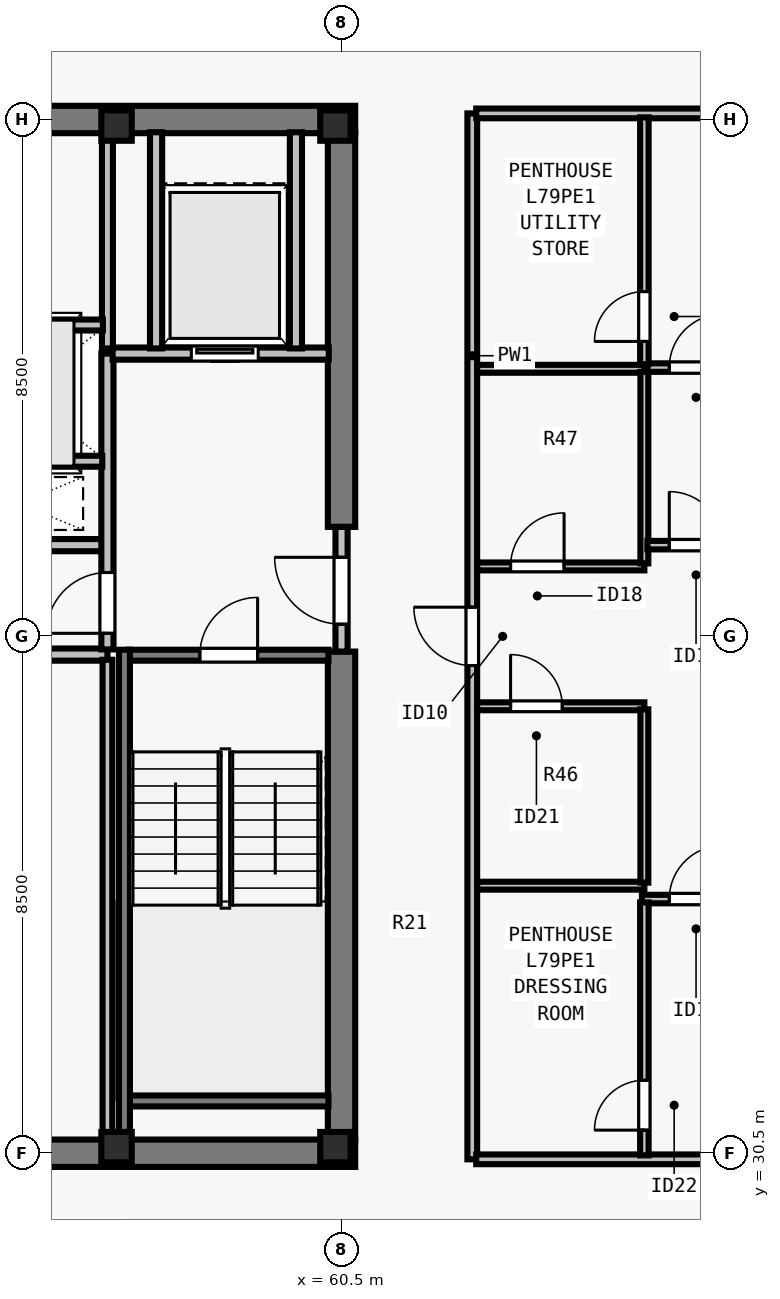
"""IFC4 building model, lengths in metres.
Left out: names, types, materials, properties, quantities, classifications, styles, units other than length and angle.
Written with IfcOpenShell. Run it as: python <this file> out.ifc"""

import sys

from ifc_helpers import new_model, si_unit, direction, frame, frame_2d, origin, origin_2d, place, context, subcontext, project, spatial, rectangle, i_section, extrude, element, fill, save


model = new_model("IFC4")
c1 = context("Model", 3, precision=1e-05, world=origin(), true_north=direction((0.0, 1.0)))
c2 = subcontext(c1, "Body", "Model", "MODEL_VIEW")
j1 = project(units=[si_unit("LENGTHUNIT", "METRE"), si_unit("PLANEANGLEUNIT", "RADIAN")], contexts=[c1])
p1 = place(None, origin())
s1 = spatial("IfcSite", under=j1, at=p1, CompositionType="ELEMENT")
p2 = place(p1, origin())
s2 = spatial("IfcBuilding", under=s1, at=p2, CompositionType="ELEMENT")
p3 = place(p2, frame((0.0, 0.0, 287.5)))
s3 = spatial("IfcBuildingStorey", under=s2, at=p3, CompositionType="ELEMENT", Elevation=287.5)
for number, where, z_axis, x_axis in (
    (1, (56.8, 30.6, 0.0), (0.0, 0.0, 1.0), (1.0, 0.0, 0.0)),
    (2, (60.4, 30.6, 0.0), (0.0, 0.0, 1.0), (1.0, 0.0, 0.0)),
    (3, (56.8, 47.4, 0.0), (0.0, 0.0, 1.0), (1.0, 0.0, 0.0)),
    (4, (60.4, 47.4, 0.0), (0.0, 0.0, 1.0), (1.0, 0.0, 0.0)),
):
    element("IfcColumn", number, at=place(p3, frame(where, z_axis=z_axis, x_axis=x_axis)), inside=s3, PredefinedType="COLUMN", context=c2, shape_type="SweptSolid", body=[
        extrude(i_section(OverallWidth=0.5, OverallDepth=0.5, WebThickness=0.028, FlangeThickness=0.045, at=origin_2d()), origin(), (0.0, 0.0, 1.0), 3.5),
    ])
for number, where, z_axis, x_axis in (
    (5, (43.275, 30.5, 0.0), (0.0, 0.0, 1.0), (1.0, 0.0, 0.0)),
    (6, (43.275, 47.5, 0.0), (0.0, 0.0, 1.0), (1.0, 0.0, 0.0)),
):
    element("IfcWall", number, at=place(p3, frame(where, z_axis=z_axis, x_axis=x_axis)), inside=s3, PredefinedType="SHEAR", context=c2, shape_type="SweptSolid", body=[
        extrude(rectangle(XDim=17.45, YDim=0.45, at=frame_2d((8.725, 0.0))), origin(), (0.0, 0.0, 1.0), 3.29),
    ])
p4 = place(p3, frame((60.5, 30.715, 0.0), z_axis=(0.0, 0.0, 1.0), x_axis=(0.0, 1.0, 0.0)))
e7 = element("IfcWall", 7, at=p4, inside=s3, PredefinedType="SHEAR", context=c2, shape_type="SweptSolid", body=[
    extrude(rectangle(XDim=8.035, YDim=0.45, at=frame_2d((4.018, 0.0))), origin(), (0.0, 0.0, 1.0), 3.29),
])
p5 = place(p3, frame((60.5, 40.8, 0.0), z_axis=(0.0, 0.0, 1.0), x_axis=(0.0, 1.0, 0.0)))
e8 = element("IfcWall", 8, at=p5, inside=s3, PredefinedType="SHEAR", context=c2, shape_type="SweptSolid", body=[
    extrude(rectangle(XDim=6.485, YDim=0.45, at=frame_2d((3.242, 0.0))), origin(), (0.0, 0.0, 1.0), 3.29),
])
for number, where, z_axis, x_axis in (
    (9, (53.7, 38.7, 0.0), (0.0, 0.0, 1.0), (1.0, 0.0, 0.0)),
    (10, (53.7, 40.5, 0.0), (0.0, 0.0, 1.0), (1.0, 0.0, 0.0)),
):
    element("IfcWall", number, at=place(p3, frame(where, z_axis=z_axis, x_axis=x_axis)), inside=s3, PredefinedType="SOLIDWALL", context=c2, shape_type="SweptSolid", body=[
        extrude(rectangle(XDim=2.95, YDim=0.2, at=frame_2d((1.475, 0.0))), origin(), (0.0, 0.0, 1.0), 3.29),
    ])
p6 = place(p3, frame((60.5, 38.75, 0.0), z_axis=(0.0, 0.0, 1.0), x_axis=(0.0, 1.0, 0.0)))
e11 = element("IfcWall", 11, at=p6, inside=s3, PredefinedType="SOLIDWALL", context=c2, shape_type="SweptSolid", body=[
    extrude(rectangle(XDim=2.05, YDim=0.2, at=frame_2d((1.025, 0.0))), origin(), (0.0, 0.0, 1.0), 3.29),
])
p7 = place(p6, frame((0.45, 0.0, 0.0)))
e12 = element("IfcOpeningElement", 12, at=p7, cuts=e11, PredefinedType="OPENING", context=c2, shape_type="SweptSolid", body=[
    extrude(rectangle(XDim=1.1, YDim=2.15, at=frame_2d((0.55, 1.075))), frame((0.0, 0.11, 0.0), z_axis=(0.0, -1.0, 0.0), x_axis=(1.0, 0.0, 0.0)), (0.0, 0.0, 1.0), 0.22),
])
p8 = place(p3, frame((56.65, 38.785, 0.0), z_axis=(0.0, 0.0, 1.0), x_axis=(0.0, 1.0, 0.0)))
e13 = element("IfcWall", 13, at=p8, inside=s3, PredefinedType="SOLIDWALL", context=c2, shape_type="SweptSolid", body=[
    extrude(rectangle(XDim=4.865, YDim=0.2, at=frame_2d((2.433, 0.0))), origin(), (0.0, 0.0, 1.0), 3.29),
])
p9 = place(p8, frame((0.265, 0.0, 0.0)))
e14 = element("IfcOpeningElement", 14, at=p9, cuts=e13, PredefinedType="OPENING", context=c2, shape_type="SweptSolid", body=[
    extrude(rectangle(XDim=1.0, YDim=2.15, at=frame_2d((0.5, 1.075))), frame((0.0, 0.11, 0.0), z_axis=(0.0, -1.0, 0.0), x_axis=(1.0, 0.0, 0.0)), (0.0, 0.0, 1.0), 0.22),
])
p10 = place(p3, frame((56.735, 43.65, 0.0), z_axis=(0.0, 0.0, 1.0), x_axis=(1.0, 0.0, 0.0)))
e15 = element("IfcWall", 15, at=p10, inside=s3, PredefinedType="SOLIDWALL", context=c2, shape_type="SweptSolid", body=[
    extrude(rectangle(XDim=3.555, YDim=0.2, at=frame_2d((1.777, 0.0))), origin(), (0.0, 0.0, 1.0), 3.29),
])
p11 = place(p10, frame((1.295, 0.0, 0.0)))
e16 = element("IfcOpeningElement", 16, at=p11, cuts=e15, PredefinedType="OPENING", context=c2, shape_type="SweptSolid", body=[
    extrude(rectangle(XDim=1.1, YDim=2.2, at=frame_2d((0.55, 1.1))), frame((0.0, 0.11, 0.0), z_axis=(0.0, -1.0, 0.0), x_axis=(1.0, 0.0, 0.0)), (0.0, 0.0, 1.0), 0.22),
])
for number, where, z_axis, x_axis in (
    (17, (57.45, 43.735, 0.0), (0.0, 0.0, 1.0), (0.0, 1.0, 0.0)),
    (18, (59.75, 43.735, 0.0), (0.0, 0.0, 1.0), (0.0, 1.0, 0.0)),
):
    element("IfcWall", number, at=place(p3, frame(where, z_axis=z_axis, x_axis=x_axis)), inside=s3, PredefinedType="SOLIDWALL", context=c2, shape_type="SweptSolid", body=[
        extrude(rectangle(XDim=3.555, YDim=0.2, at=frame_2d((1.777, 0.0))), origin(), (0.0, 0.0, 1.0), 3.29),
    ])
p12 = place(p3, frame((56.65, 30.71, 0.0), z_axis=(0.0, 0.0, 1.0), x_axis=(0.0, 1.0, 0.0)))
e19 = element("IfcWall", 19, at=p12, inside=s3, PredefinedType="PARTITIONING", context=c2, shape_type="SweptSolid", body=[
    extrude(rectangle(XDim=7.905, YDim=0.16, at=frame_2d((3.953, 0.0))), origin(), (0.0, 0.0, 1.0), 3.29),
])
p13 = place(p3, frame((56.65, 43.735, 0.0), z_axis=(0.0, 0.0, 1.0), x_axis=(0.0, 1.0, 0.0)))
e20 = element("IfcWall", 20, at=p13, inside=s3, PredefinedType="SOLIDWALL", context=c2, shape_type="SweptSolid", body=[
    extrude(rectangle(XDim=3.555, YDim=0.18, at=frame_2d((1.777, 0.0))), origin(), (0.0, 0.0, 1.0), 3.29),
])
p14 = place(p3, frame((53.785, 41.88, 0.0), z_axis=(0.0, 0.0, 1.0), x_axis=(1.0, 0.0, 0.0)))
e21 = element("IfcWall", 21, at=p14, inside=s3, PredefinedType="SOLIDWALL", context=c2, shape_type="SweptSolid", body=[
    extrude(rectangle(XDim=2.78, YDim=0.18, at=frame_2d((1.39, 0.0))), origin(), (0.0, 0.0, 1.0), 3.29),
])
p15 = place(p3, frame((53.785, 44.12, 0.0), z_axis=(0.0, 0.0, 1.0), x_axis=(1.0, 0.0, 0.0)))
e22 = element("IfcWall", 22, at=p15, inside=s3, PredefinedType="SOLIDWALL", context=c2, shape_type="SweptSolid", body=[
    extrude(rectangle(XDim=2.79, YDim=0.18, at=frame_2d((1.395, 0.0))), origin(), (0.0, 0.0, 1.0), 3.29),
])
p16 = place(p3, frame((62.65, 30.4, 0.0), z_axis=(0.0, 0.0, 1.0), x_axis=(0.0, 1.0, 0.0)))
e23 = element("IfcWall", 23, at=p16, inside=s3, PredefinedType="PARTITIONING", context=c2, shape_type="SweptSolid", body=[
    extrude(rectangle(XDim=17.2, YDim=0.16, at=frame_2d((8.6, 0.0))), origin(), (0.0, 0.0, 1.0), 3.29),
])
p17 = place(p16, frame((8.12, 0.0, 0.0)))
e24 = element("IfcOpeningElement", 24, at=p17, cuts=e23, PredefinedType="OPENING", context=c2, shape_type="SweptSolid", body=[
    extrude(rectangle(XDim=0.96, YDim=2.18, at=frame_2d((0.48, 1.09))), frame((0.0, 0.09, 0.0), z_axis=(0.0, -1.0, 0.0), x_axis=(1.0, 0.0, 0.0)), (0.0, 0.0, 1.0), 0.18),
])
for number, where, z_axis, x_axis in (
    (25, (62.715, 30.4, 0.0), (0.0, 0.0, 1.0), (1.0, 0.0, 0.0)),
    (26, (62.715, 47.6, 0.0), (0.0, 0.0, 1.0), (1.0, 0.0, 0.0)),
):
    element("IfcWall", number, at=place(p3, frame(where, z_axis=z_axis, x_axis=x_axis)), inside=s3, PredefinedType="PARTITIONING", context=c2, shape_type="SweptSolid", body=[
        extrude(rectangle(XDim=10.0, YDim=0.16, at=frame_2d((5.0, 0.0))), origin(), (0.0, 0.0, 1.0), 3.29),
    ])
p18 = place(p3, frame((62.73, 34.9, 0.0), z_axis=(0.0, 0.0, 1.0), x_axis=(1.0, 0.0, 0.0)))
e27 = element("IfcWall", 27, at=p18, inside=s3, PredefinedType="PLUMBINGWALL", context=c2, shape_type="SweptSolid", body=[
    extrude(rectangle(XDim=2.75, YDim=0.13, at=frame_2d((1.375, 0.0))), origin(), (0.0, 0.0, 1.0), 3.29),
])
p19 = place(p3, frame((62.73, 37.85, 0.0), z_axis=(0.0, 0.0, 1.0), x_axis=(1.0, 0.0, 0.0)))
e28 = element("IfcWall", 28, at=p19, inside=s3, PredefinedType="PLUMBINGWALL", context=c2, shape_type="SweptSolid", body=[
    extrude(rectangle(XDim=2.75, YDim=0.13, at=frame_2d((1.375, 0.0))), origin(), (0.0, 0.0, 1.0), 3.29),
])
p20 = place(p19, frame((0.55, 0.0, 0.0)))
e29 = element("IfcOpeningElement", 29, at=p20, cuts=e28, PredefinedType="OPENING", context=c2, shape_type="SweptSolid", body=[
    extrude(rectangle(XDim=0.85, YDim=2.08, at=frame_2d((0.425, 1.04))), frame((0.0, 0.075, 0.0), z_axis=(0.0, -1.0, 0.0), x_axis=(1.0, 0.0, 0.0)), (0.0, 0.0, 1.0), 0.15),
])
p21 = place(p3, frame((65.48, 34.95, 0.0), z_axis=(0.0, 0.0, 1.0), x_axis=(0.0, 1.0, 0.0)))
e30 = element("IfcWall", 30, at=p21, inside=s3, PredefinedType="PLUMBINGWALL", context=c2, shape_type="SweptSolid", body=[
    extrude(rectangle(XDim=2.85, YDim=0.13, at=frame_2d((1.425, 0.0))), origin(), (0.0, 0.0, 1.0), 3.29),
])
p22 = place(p3, frame((62.73, 43.4, 0.0), z_axis=(0.0, 0.0, 1.0), x_axis=(1.0, 0.0, 0.0)))
e31 = element("IfcWall", 31, at=p22, inside=s3, PredefinedType="PLUMBINGWALL", context=c2, shape_type="SweptSolid", body=[
    extrude(rectangle(XDim=2.75, YDim=0.13, at=frame_2d((1.375, 0.0))), origin(), (0.0, 0.0, 1.0), 3.29),
])
p23 = place(p3, frame((62.73, 40.15, 0.0), z_axis=(0.0, 0.0, 1.0), x_axis=(1.0, 0.0, 0.0)))
e32 = element("IfcWall", 32, at=p23, inside=s3, PredefinedType="PLUMBINGWALL", context=c2, shape_type="SweptSolid", body=[
    extrude(rectangle(XDim=2.75, YDim=0.13, at=frame_2d((1.375, 0.0))), origin(), (0.0, 0.0, 1.0), 3.29),
])
p24 = place(p23, frame((0.55, 0.0, 0.0)))
e33 = element("IfcOpeningElement", 33, at=p24, cuts=e32, PredefinedType="OPENING", context=c2, shape_type="SweptSolid", body=[
    extrude(rectangle(XDim=0.88, YDim=2.1, at=frame_2d((0.44, 1.05))), frame((0.0, 0.075, 0.0), z_axis=(0.0, -1.0, 0.0), x_axis=(1.0, 0.0, 0.0)), (0.0, 0.0, 1.0), 0.15),
])
p25 = place(p3, frame((65.48, 40.2, 0.0), z_axis=(0.0, 0.0, 1.0), x_axis=(0.0, 1.0, 0.0)))
e34 = element("IfcWall", 34, at=p25, inside=s3, PredefinedType="PLUMBINGWALL", context=c2, shape_type="SweptSolid", body=[
    extrude(rectangle(XDim=3.15, YDim=0.13, at=frame_2d((1.575, 0.0))), origin(), (0.0, 0.0, 1.0), 3.29),
])
p26 = place(p3, frame((65.44, 34.68, 0.0), z_axis=(0.0, 0.0, 1.0), x_axis=(1.0, 0.0, 0.0)))
e35 = element("IfcWall", 35, at=p26, inside=s3, PredefinedType="PARTITIONING", context=c2, shape_type="SweptSolid", body=[
    extrude(rectangle(XDim=7.18, YDim=0.14, at=frame_2d((3.59, 0.0))), origin(), (0.0, 0.0, 1.0), 3.29),
])
p27 = place(p26, frame((0.45, 0.0, 0.0)))
e36 = element("IfcOpeningElement", 36, at=p27, cuts=e35, PredefinedType="OPENING", context=c2, shape_type="SweptSolid", body=[
    extrude(rectangle(XDim=0.88, YDim=2.1, at=frame_2d((0.44, 1.05))), frame((0.0, 0.08, 0.0), z_axis=(0.0, -1.0, 0.0), x_axis=(1.0, 0.0, 0.0)), (0.0, 0.0, 1.0), 0.16),
])
p28 = place(p3, frame((65.48, 30.465, 0.0), z_axis=(0.0, 0.0, 1.0), x_axis=(0.0, 1.0, 0.0)))
e37 = element("IfcWall", 37, at=p28, inside=s3, PredefinedType="PARTITIONING", context=c2, shape_type="SweptSolid", body=[
    extrude(rectangle(XDim=4.16, YDim=0.14, at=frame_2d((2.08, 0.0))), origin(), (0.0, 0.0, 1.0), 3.29),
])
p29 = place(p28, frame((0.415, 0.0, 0.0)))
e38 = element("IfcOpeningElement", 38, at=p29, cuts=e37, PredefinedType="OPENING", context=c2, shape_type="SweptSolid", body=[
    extrude(rectangle(XDim=0.82, YDim=2.1, at=frame_2d((0.41, 1.05))), frame((0.0, 0.08, 0.0), z_axis=(0.0, -1.0, 0.0), x_axis=(1.0, 0.0, 0.0)), (0.0, 0.0, 1.0), 0.16),
])
p30 = place(p3, frame((65.53, 43.42, 0.0), z_axis=(0.0, 0.0, 1.0), x_axis=(1.0, 0.0, 0.0)))
e39 = element("IfcWall", 39, at=p30, inside=s3, PredefinedType="PARTITIONING", context=c2, shape_type="SweptSolid", body=[
    extrude(rectangle(XDim=7.09, YDim=0.14, at=frame_2d((3.545, 0.0))), origin(), (0.0, 0.0, 1.0), 3.29),
])
p31 = place(p30, frame((0.36, 0.0, 0.0)))
e40 = element("IfcOpeningElement", 40, at=p31, cuts=e39, PredefinedType="OPENING", context=c2, shape_type="SweptSolid", body=[
    extrude(rectangle(XDim=0.88, YDim=2.1, at=frame_2d((0.44, 1.05))), frame((0.0, 0.08, 0.0), z_axis=(0.0, -1.0, 0.0), x_axis=(1.0, 0.0, 0.0)), (0.0, 0.0, 1.0), 0.16),
])
p32 = place(p3, frame((65.48, 43.475, 0.0), z_axis=(0.0, 0.0, 1.0), x_axis=(0.0, 1.0, 0.0)))
e41 = element("IfcWall", 41, at=p32, inside=s3, PredefinedType="PARTITIONING", context=c2, shape_type="SweptSolid", body=[
    extrude(rectangle(XDim=4.06, YDim=0.14, at=frame_2d((2.03, 0.0))), origin(), (0.0, 0.0, 1.0), 3.29),
])
p33 = place(p32, frame((0.375, 0.0, 0.0)))
e42 = element("IfcOpeningElement", 42, at=p33, cuts=e41, PredefinedType="OPENING", context=c2, shape_type="SweptSolid", body=[
    extrude(rectangle(XDim=0.82, YDim=2.1, at=frame_2d((0.41, 1.05))), frame((0.0, 0.08, 0.0), z_axis=(0.0, -1.0, 0.0), x_axis=(1.0, 0.0, 0.0)), (0.0, 0.0, 1.0), 0.16),
])
p34 = place(p3, frame((65.53, 40.5, 0.0), z_axis=(0.0, 0.0, 1.0), x_axis=(1.0, 0.0, 0.0)))
e43 = element("IfcWall", 43, at=p34, inside=s3, PredefinedType="PARTITIONING", context=c2, shape_type="SweptSolid", body=[
    extrude(rectangle(XDim=7.09, YDim=0.14, at=frame_2d((3.545, 0.0))), origin(), (0.0, 0.0, 1.0), 3.29),
])
p35 = place(p34, frame((0.36, 0.0, 0.0)))
e44 = element("IfcOpeningElement", 44, at=p35, cuts=e43, PredefinedType="OPENING", context=c2, shape_type="SweptSolid", body=[
    extrude(rectangle(XDim=0.88, YDim=2.1, at=frame_2d((0.44, 1.05))), frame((0.0, 0.08, 0.0), z_axis=(0.0, -1.0, 0.0), x_axis=(1.0, 0.0, 0.0)), (0.0, 0.0, 1.0), 0.16),
])
p36 = place(p3, frame((57.005, 38.69, 0.0), z_axis=(0.0, 0.0, 1.0), x_axis=(1.0, 0.0, 0.0)))
e45 = element("IfcWall", 45, at=p36, inside=s3, PredefinedType="SOLIDWALL", context=c2, shape_type="SweptSolid", body=[
    extrude(rectangle(XDim=3.28, YDim=0.18, at=frame_2d((1.64, 0.0))), origin(), (0.0, 0.0, 1.0), 3.29),
])
p37 = place(p36, frame((1.165, 0.0, 0.0)))
e46 = element("IfcOpeningElement", 46, at=p37, cuts=e45, PredefinedType="OPENING", context=c2, shape_type="SweptSolid", body=[
    extrude(rectangle(XDim=0.95, YDim=2.15, at=frame_2d((0.475, 1.075))), frame((0.0, 0.1, 0.0), z_axis=(0.0, -1.0, 0.0), x_axis=(1.0, 0.0, 0.0)), (0.0, 0.0, 1.0), 0.2),
])
p38 = place(p3, frame((57.005, 31.36, 0.0), z_axis=(0.0, 0.0, 1.0), x_axis=(1.0, 0.0, 0.0)))
e47 = element("IfcWall", 47, at=p38, inside=s3, PredefinedType="SOLIDWALL", context=c2, shape_type="SweptSolid", body=[
    extrude(rectangle(XDim=3.28, YDim=0.18, at=frame_2d((1.64, 0.0))), origin(), (0.0, 0.0, 1.0), 3.29),
])
p39 = place(p3, frame((56.93, 38.78, 0.0), z_axis=(0.0, 0.0, 1.0), x_axis=(0.0, -1.0, 0.0)))
e48 = element("IfcWall", 48, at=p39, inside=s3, PredefinedType="SOLIDWALL", context=c2, shape_type="SweptSolid", body=[
    extrude(rectangle(XDim=8.067, YDim=0.18, at=frame_2d((4.034, 0.0))), origin(), (0.0, 0.0, 1.0), 3.29),
])
p40 = place(p7, origin())
e49 = element("IfcDoor", 49, at=p40, inside=s3, OperationType="SINGLE_SWING_RIGHT", PredefinedType="DOOR", context=c2, shape_type="SweptSolid", body=[
    extrude(rectangle(XDim=1.1, YDim=2.15, at=frame_2d((0.55, 1.075))), frame((0.0, 0.025, 0.0), z_axis=(0.0, -1.0, 0.0), x_axis=(1.0, 0.0, 0.0)), (0.0, 0.0, 1.0), 0.05),
])
fill(e12, e49)
p41 = place(p9, origin())
e50 = element("IfcDoor", 50, at=p41, inside=s3, OperationType="SINGLE_SWING_LEFT", PredefinedType="DOOR", context=c2, shape_type="SweptSolid", body=[
    extrude(rectangle(XDim=1.0, YDim=2.15, at=frame_2d((0.5, 1.075))), frame((0.0, 0.025, 0.0), z_axis=(0.0, -1.0, 0.0), x_axis=(1.0, 0.0, 0.0)), (0.0, 0.0, 1.0), 0.05),
])
fill(e14, e50)
p42 = place(p11, origin())
e51 = element("IfcDoor", 51, at=p42, inside=s3, OperationType="SLIDING_TO_LEFT", PredefinedType="DOOR", context=c2, shape_type="SweptSolid", body=[
    extrude(rectangle(XDim=1.1, YDim=2.2, at=frame_2d((0.55, 1.1))), frame((0.0, 0.025, 0.0), z_axis=(0.0, -1.0, 0.0), x_axis=(1.0, 0.0, 0.0)), (0.0, 0.0, 1.0), 0.05),
])
fill(e16, e51)
p43 = place(p20, origin())
e52 = element("IfcDoor", 52, at=p43, inside=s3, OperationType="SINGLE_SWING_LEFT", PredefinedType="DOOR", context=c2, shape_type="SweptSolid", body=[
    extrude(rectangle(XDim=0.85, YDim=2.08, at=frame_2d((0.425, 1.04))), frame((0.0, 0.025, 0.0), z_axis=(0.0, -1.0, 0.0), x_axis=(1.0, 0.0, 0.0)), (0.0, 0.0, 1.0), 0.05),
])
fill(e29, e52)
p44 = place(p24, origin())
e53 = element("IfcDoor", 53, at=p44, inside=s3, OperationType="SINGLE_SWING_RIGHT", PredefinedType="DOOR", context=c2, shape_type="SweptSolid", body=[
    extrude(rectangle(XDim=0.88, YDim=2.1, at=frame_2d((0.44, 1.05))), frame((0.0, 0.025, 0.0), z_axis=(0.0, -1.0, 0.0), x_axis=(1.0, 0.0, 0.0)), (0.0, 0.0, 1.0), 0.05),
])
fill(e33, e53)
p45 = place(p29, origin())
e54 = element("IfcDoor", 54, at=p45, inside=s3, OperationType="SINGLE_SWING_LEFT", PredefinedType="DOOR", context=c2, shape_type="SweptSolid", body=[
    extrude(rectangle(XDim=0.82, YDim=2.1, at=frame_2d((0.41, 1.05))), frame((0.0, 0.025, 0.0), z_axis=(0.0, -1.0, 0.0), x_axis=(1.0, 0.0, 0.0)), (0.0, 0.0, 1.0), 0.05),
])
fill(e38, e54)
p46 = place(p27, origin())
e55 = element("IfcDoor", 55, at=p46, inside=s3, OperationType="SINGLE_SWING_RIGHT", PredefinedType="DOOR", context=c2, shape_type="SweptSolid", body=[
    extrude(rectangle(XDim=0.88, YDim=2.1, at=frame_2d((0.44, 1.05))), frame((0.0, 0.025, 0.0), z_axis=(0.0, -1.0, 0.0), x_axis=(1.0, 0.0, 0.0)), (0.0, 0.0, 1.0), 0.05),
])
fill(e36, e55)
p47 = place(p33, origin())
e56 = element("IfcDoor", 56, at=p47, inside=s3, OperationType="SINGLE_SWING_LEFT", PredefinedType="DOOR", context=c2, shape_type="SweptSolid", body=[
    extrude(rectangle(XDim=0.82, YDim=2.1, at=frame_2d((0.41, 1.05))), frame((0.0, 0.025, 0.0), z_axis=(0.0, -1.0, 0.0), x_axis=(1.0, 0.0, 0.0)), (0.0, 0.0, 1.0), 0.05),
])
fill(e42, e56)
p48 = place(p31, origin())
e57 = element("IfcDoor", 57, at=p48, inside=s3, OperationType="SINGLE_SWING_RIGHT", PredefinedType="DOOR", context=c2, shape_type="SweptSolid", body=[
    extrude(rectangle(XDim=0.88, YDim=2.1, at=frame_2d((0.44, 1.05))), frame((0.0, 0.025, 0.0), z_axis=(0.0, -1.0, 0.0), x_axis=(1.0, 0.0, 0.0)), (0.0, 0.0, 1.0), 0.05),
])
fill(e40, e57)
p49 = place(p35, origin())
e58 = element("IfcDoor", 58, at=p49, inside=s3, OperationType="SINGLE_SWING_LEFT", PredefinedType="DOOR", context=c2, shape_type="SweptSolid", body=[
    extrude(rectangle(XDim=0.88, YDim=2.1, at=frame_2d((0.44, 1.05))), frame((0.0, 0.025, 0.0), z_axis=(0.0, -1.0, 0.0), x_axis=(1.0, 0.0, 0.0)), (0.0, 0.0, 1.0), 0.05),
])
fill(e44, e58)
p50 = place(p17, origin())
e59 = element("IfcDoor", 59, at=p50, inside=s3, OperationType="SINGLE_SWING_RIGHT", PredefinedType="DOOR", context=c2, shape_type="SweptSolid", body=[
    extrude(rectangle(XDim=0.96, YDim=2.18, at=frame_2d((0.48, 1.09))), frame((0.0, 0.025, 0.0), z_axis=(0.0, -1.0, 0.0), x_axis=(1.0, 0.0, 0.0)), (0.0, 0.0, 1.0), 0.05),
])
fill(e24, e59)
p51 = place(p37, origin())
e60 = element("IfcDoor", 60, at=p51, inside=s3, OperationType="SINGLE_SWING_RIGHT", PredefinedType="DOOR", context=c2, shape_type="SweptSolid", body=[
    extrude(rectangle(XDim=0.95, YDim=2.15, at=frame_2d((0.475, 1.075))), frame((0.0, 0.025, 0.0), z_axis=(0.0, -1.0, 0.0), x_axis=(1.0, 0.0, 0.0)), (0.0, 0.0, 1.0), 0.05),
])
fill(e46, e60)
save(model, sys.argv[1])
